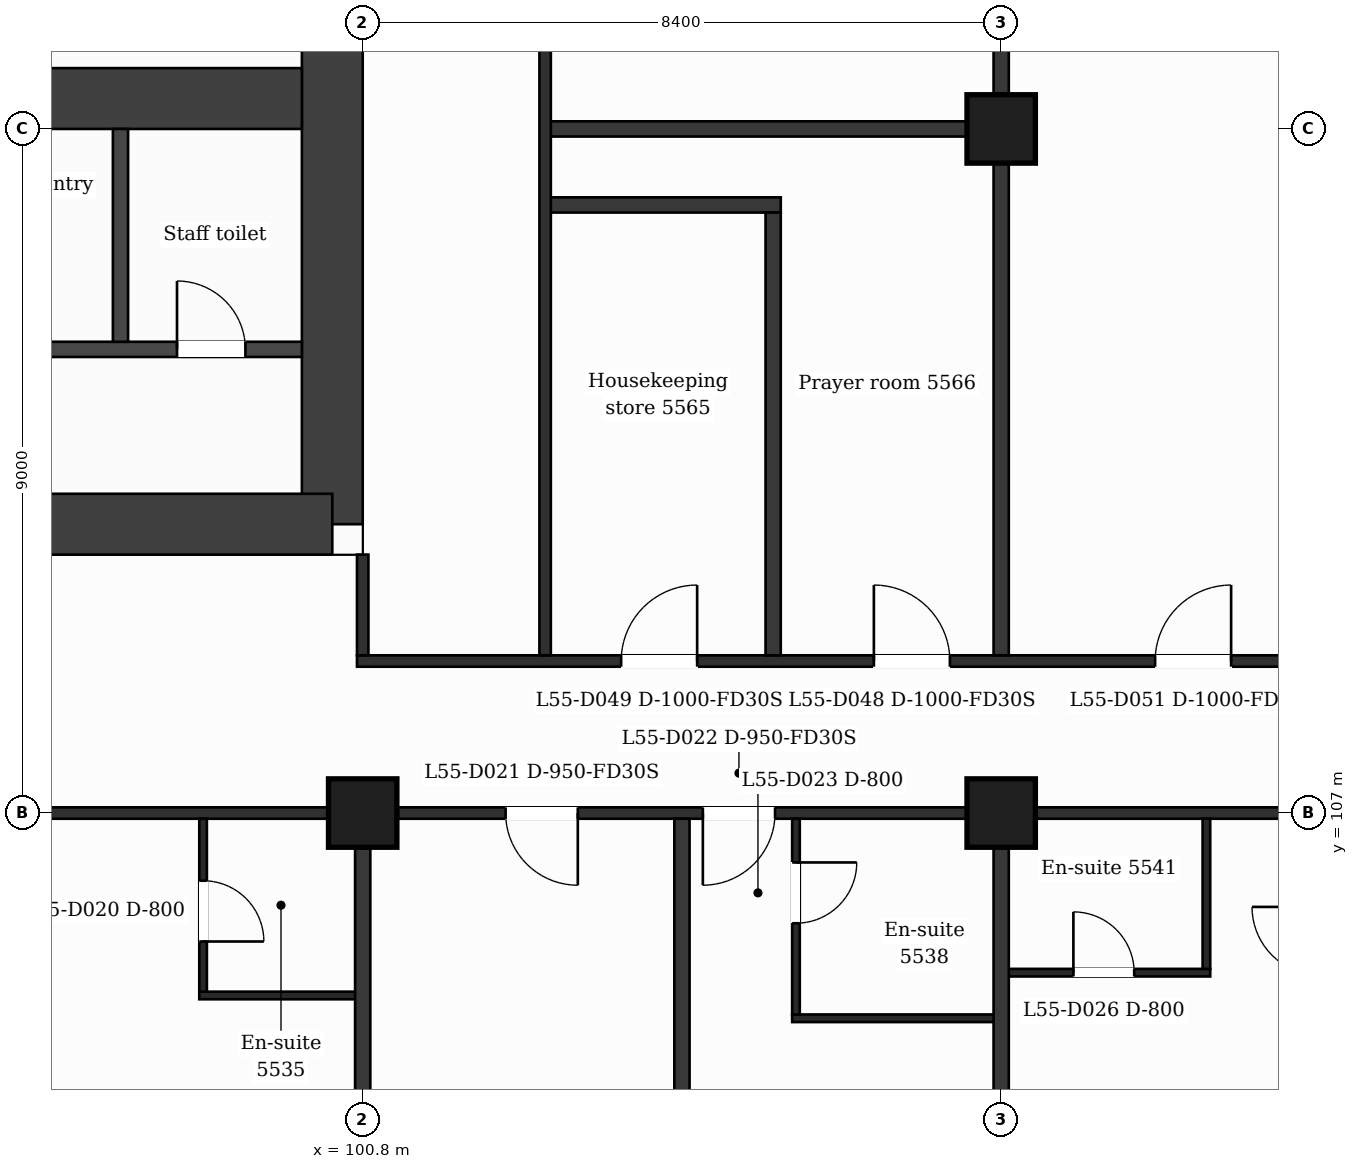
"""IFC4 building model, lengths in metres.
Left out: names, types, materials, properties, quantities, classifications, styles, units other than length and angle.
Written with IfcOpenShell. Run it as: python <this file> out.ifc"""

import sys

from ifc_helpers import new_model, si_unit, direction, frame, frame_2d, origin, origin_2d, place, context, subcontext, project, spatial, rectangle, extrude, element, fill, save


model = new_model("IFC4")
c1 = context("Model", 3, precision=1e-05, world=origin(), true_north=direction((0.0, 1.0)))
c2 = subcontext(c1, "Body", "Model", "MODEL_VIEW")
j1 = project(units=[si_unit("LENGTHUNIT", "METRE"), si_unit("PLANEANGLEUNIT", "RADIAN")], contexts=[c1])
p1 = place(None, origin())
s1 = spatial("IfcSite", under=j1, at=p1, CompositionType="ELEMENT")
p2 = place(p1, origin())
s2 = spatial("IfcBuilding", under=s1, at=p2, CompositionType="ELEMENT")
p3 = place(p2, frame((0.0, 0.0, 228.1)))
s3 = spatial("IfcBuildingStorey", under=s2, at=p3, CompositionType="ELEMENT", Elevation=228.1)
p4 = place(p3, frame((100.4, 132.0, 0.0), z_axis=(0.0, 0.0, 1.0), x_axis=(0.0, -1.0, 0.0)))
e1 = element("IfcWall", 1, at=p4, inside=s3, PredefinedType="SHEAR", context=c2, shape_type="SweptSolid", body=[
    extrude(rectangle(XDim=21.2, YDim=0.8, at=frame_2d((10.6, 0.0))), origin(), (0.0, 0.0, 1.0), 3.7),
])
p5 = place(p4, frame((7.85, 0.0, 0.0)))
e2 = element("IfcOpeningElement", 2, at=p5, cuts=e1, PredefinedType="OPENING", context=c2, shape_type="SweptSolid", body=[
    extrude(rectangle(XDim=1.4, YDim=2.1, at=frame_2d((0.7, 1.05))), frame((0.0, 0.41, 0.0), z_axis=(0.0, -1.0, 0.0), x_axis=(1.0, 0.0, 0.0)), (0.0, 0.0, 1.0), 0.82),
])
p6 = place(p3, frame((100.4, 110.8, 0.0), z_axis=(0.0, 0.0, 1.0), x_axis=(-1.0, 0.0, 0.0)))
e3 = element("IfcWall", 3, at=p6, inside=s3, PredefinedType="SHEAR", context=c2, shape_type="SweptSolid", body=[
    extrude(rectangle(XDim=14.273, YDim=0.8, at=frame_2d((7.137, 0.0))), origin(), (0.0, 0.0, 1.0), 3.7),
])
p7 = place(p6, frame((5.908, 0.0, 0.0)))
e4 = element("IfcOpeningElement", 4, at=p7, cuts=e3, PredefinedType="OPENING", context=c2, shape_type="SweptSolid", body=[
    extrude(rectangle(XDim=1.4, YDim=2.1, at=frame_2d((0.7, 1.05))), frame((0.0, 0.41, 0.0), z_axis=(0.0, -1.0, 0.0), x_axis=(1.0, 0.0, 0.0)), (0.0, 0.0, 1.0), 0.82),
])
p8 = place(p3, frame((94.7, 116.4, 0.0), z_axis=(0.0, 0.0, 1.0), x_axis=(1.0, 0.0, 0.0)))
e5 = element("IfcWall", 5, at=p8, inside=s3, PredefinedType="SHEAR", context=c2, shape_type="SweptSolid", body=[
    extrude(rectangle(XDim=5.3, YDim=0.8, at=frame_2d((2.65, 0.0))), origin(), (0.0, 0.0, 1.0), 3.7),
])
for number, where, z_axis, x_axis in (
    (6, (100.8, 107.0, 0.0), (0.0, 0.0, 1.0), (1.0, 0.0, 0.0)),
    (7, (109.2, 107.0, 0.0), (0.0, 0.0, 1.0), (1.0, 0.0, 0.0)),
    (8, (109.2, 116.0, 0.0), (0.0, 0.0, 1.0), (1.0, 0.0, 0.0)),
):
    element("IfcColumn", number, at=place(p3, frame(where, z_axis=z_axis, x_axis=x_axis)), inside=s3, PredefinedType="COLUMN", context=c2, shape_type="SweptSolid", body=[
        extrude(rectangle(XDim=0.9, YDim=0.9, at=origin_2d()), origin(), (0.0, 0.0, 1.0), 3.7),
    ])
p9 = place(p3, frame((106.45, 104.3, 0.0), z_axis=(0.0, 0.0, 1.0), x_axis=(1.0, 0.0, 0.0)))
e9 = element("IfcWall", 9, at=p9, inside=s3, PredefinedType="PARTITIONING", context=c2, shape_type="SweptSolid", body=[
    extrude(rectangle(XDim=2.75, YDim=0.1, at=frame_2d((1.375, 0.0))), origin(), (0.0, 0.0, 1.0), 3.38),
])
p10 = place(p3, frame((98.65, 104.6, 0.0), z_axis=(0.0, 0.0, 1.0), x_axis=(1.0, 0.0, 0.0)))
e10 = element("IfcWall", 10, at=p10, inside=s3, PredefinedType="PARTITIONING", context=c2, shape_type="SweptSolid", body=[
    extrude(rectangle(XDim=2.15, YDim=0.1, at=frame_2d((1.075, 0.0))), origin(), (0.0, 0.0, 1.0), 3.38),
])
p11 = place(p3, frame((109.2, 104.9, 0.0), z_axis=(0.0, 0.0, 1.0), x_axis=(1.0, 0.0, 0.0)))
e11 = element("IfcWall", 11, at=p11, inside=s3, PredefinedType="PARTITIONING", context=c2, shape_type="SweptSolid", body=[
    extrude(rectangle(XDim=2.75, YDim=0.1, at=frame_2d((1.375, 0.0))), origin(), (0.0, 0.0, 1.0), 3.38),
])
p12 = place(p11, frame((0.95, 0.0, 0.0)))
e12 = element("IfcOpeningElement", 12, at=p12, cuts=e11, PredefinedType="OPENING", context=c2, shape_type="SweptSolid", body=[
    extrude(rectangle(XDim=0.8, YDim=2.1, at=frame_2d((0.4, 1.05))), frame((0.0, 0.06, 0.0), z_axis=(0.0, -1.0, 0.0), x_axis=(1.0, 0.0, 0.0)), (0.0, 0.0, 1.0), 0.12),
])
p13 = place(p3, frame((87.018, 107.0, 0.0), z_axis=(0.0, 0.0, 1.0), x_axis=(1.0, 0.0, 0.0)))
e13 = element("IfcWall", 13, at=p13, inside=s3, PredefinedType="PARTITIONING", context=c2, shape_type="SweptSolid", body=[
    extrude(rectangle(XDim=52.765, YDim=0.15, at=frame_2d((26.382, 0.0))), origin(), (0.0, 0.0, 1.0), 3.38),
])
p14 = place(p13, frame((0.707, 0.0, 0.0)))
e14 = element("IfcOpeningElement", 14, at=p14, cuts=e13, PredefinedType="OPENING", context=c2, shape_type="SweptSolid", body=[
    extrude(rectangle(XDim=0.95, YDim=2.1, at=frame_2d((0.475, 1.05))), frame((0.0, 0.085, 0.0), z_axis=(0.0, -1.0, 0.0), x_axis=(1.0, 0.0, 0.0)), (0.0, 0.0, 1.0), 0.17),
])
p15 = place(p13, frame((6.894, 0.0, 0.0)))
e15 = element("IfcOpeningElement", 15, at=p15, cuts=e13, PredefinedType="OPENING", context=c2, shape_type="SweptSolid", body=[
    extrude(rectangle(XDim=0.95, YDim=2.1, at=frame_2d((0.475, 1.05))), frame((0.0, 0.085, 0.0), z_axis=(0.0, -1.0, 0.0), x_axis=(1.0, 0.0, 0.0)), (0.0, 0.0, 1.0), 0.17),
])
p16 = place(p13, frame((15.662, 0.0, 0.0)))
e16 = element("IfcOpeningElement", 16, at=p16, cuts=e13, PredefinedType="OPENING", context=c2, shape_type="SweptSolid", body=[
    extrude(rectangle(XDim=0.95, YDim=2.1, at=frame_2d((0.475, 1.05))), frame((0.0, 0.085, 0.0), z_axis=(0.0, -1.0, 0.0), x_axis=(1.0, 0.0, 0.0)), (0.0, 0.0, 1.0), 0.17),
])
p17 = place(p13, frame((18.257, 0.0, 0.0)))
e17 = element("IfcOpeningElement", 17, at=p17, cuts=e13, PredefinedType="OPENING", context=c2, shape_type="SweptSolid", body=[
    extrude(rectangle(XDim=0.95, YDim=2.1, at=frame_2d((0.475, 1.05))), frame((0.0, 0.085, 0.0), z_axis=(0.0, -1.0, 0.0), x_axis=(1.0, 0.0, 0.0)), (0.0, 0.0, 1.0), 0.17),
])
p18 = place(p13, frame((28.607, 0.0, 0.0)))
e18 = element("IfcOpeningElement", 18, at=p18, cuts=e13, PredefinedType="OPENING", context=c2, shape_type="SweptSolid", body=[
    extrude(rectangle(XDim=1.0, YDim=2.1, at=frame_2d((0.5, 1.05))), frame((0.0, 0.085, 0.0), z_axis=(0.0, -1.0, 0.0), x_axis=(1.0, 0.0, 0.0)), (0.0, 0.0, 1.0), 0.17),
])
p19 = place(p13, frame((31.302, 0.0, 0.0)))
e19 = element("IfcOpeningElement", 19, at=p19, cuts=e13, PredefinedType="OPENING", context=c2, shape_type="SweptSolid", body=[
    extrude(rectangle(XDim=0.95, YDim=2.1, at=frame_2d((0.475, 1.05))), frame((0.0, 0.085, 0.0), z_axis=(0.0, -1.0, 0.0), x_axis=(1.0, 0.0, 0.0)), (0.0, 0.0, 1.0), 0.17),
])
p20 = place(p13, frame((35.057, 0.0, 0.0)))
e20 = element("IfcOpeningElement", 20, at=p20, cuts=e13, PredefinedType="OPENING", context=c2, shape_type="SweptSolid", body=[
    extrude(rectangle(XDim=0.95, YDim=2.1, at=frame_2d((0.475, 1.05))), frame((0.0, 0.085, 0.0), z_axis=(0.0, -1.0, 0.0), x_axis=(1.0, 0.0, 0.0)), (0.0, 0.0, 1.0), 0.17),
])
p21 = place(p13, frame((41.957, 0.0, 0.0)))
e21 = element("IfcOpeningElement", 21, at=p21, cuts=e13, PredefinedType="OPENING", context=c2, shape_type="SweptSolid", body=[
    extrude(rectangle(XDim=0.95, YDim=2.1, at=frame_2d((0.475, 1.05))), frame((0.0, 0.085, 0.0), z_axis=(0.0, -1.0, 0.0), x_axis=(1.0, 0.0, 0.0)), (0.0, 0.0, 1.0), 0.17),
])
p22 = place(p13, frame((45.712, 0.0, 0.0)))
e22 = element("IfcOpeningElement", 22, at=p22, cuts=e13, PredefinedType="OPENING", context=c2, shape_type="SweptSolid", body=[
    extrude(rectangle(XDim=1.0, YDim=2.1, at=frame_2d((0.5, 1.05))), frame((0.0, 0.085, 0.0), z_axis=(0.0, -1.0, 0.0), x_axis=(1.0, 0.0, 0.0)), (0.0, 0.0, 1.0), 0.17),
])
p23 = place(p13, frame((48.974, 0.0, 0.0)))
e23 = element("IfcOpeningElement", 23, at=p23, cuts=e13, PredefinedType="OPENING", context=c2, shape_type="SweptSolid", body=[
    extrude(rectangle(XDim=0.95, YDim=2.1, at=frame_2d((0.475, 1.05))), frame((0.0, 0.085, 0.0), z_axis=(0.0, -1.0, 0.0), x_axis=(1.0, 0.0, 0.0)), (0.0, 0.0, 1.0), 0.17),
])
p24 = place(p3, frame((100.725, 109.0, 0.0), z_axis=(0.0, 0.0, 1.0), x_axis=(1.0, 0.0, 0.0)))
e24 = element("IfcWall", 24, at=p24, inside=s3, PredefinedType="PARTITIONING", context=c2, shape_type="SweptSolid", body=[
    extrude(rectangle(XDim=25.35, YDim=0.15, at=frame_2d((12.675, 0.0))), origin(), (0.0, 0.0, 1.0), 3.38),
])
p25 = place(p24, frame((6.8, 0.0, 0.0)))
e25 = element("IfcOpeningElement", 25, at=p25, cuts=e24, PredefinedType="OPENING", context=c2, shape_type="SweptSolid", body=[
    extrude(rectangle(XDim=1.0, YDim=2.1, at=frame_2d((0.5, 1.05))), frame((0.0, 0.085, 0.0), z_axis=(0.0, -1.0, 0.0), x_axis=(1.0, 0.0, 0.0)), (0.0, 0.0, 1.0), 0.17),
])
p26 = place(p24, frame((3.475, 0.0, 0.0)))
e26 = element("IfcOpeningElement", 26, at=p26, cuts=e24, PredefinedType="OPENING", context=c2, shape_type="SweptSolid", body=[
    extrude(rectangle(XDim=1.0, YDim=2.1, at=frame_2d((0.5, 1.05))), frame((0.0, 0.085, 0.0), z_axis=(0.0, -1.0, 0.0), x_axis=(1.0, 0.0, 0.0)), (0.0, 0.0, 1.0), 0.17),
])
p27 = place(p24, frame((10.5, 0.0, 0.0)))
e27 = element("IfcOpeningElement", 27, at=p27, cuts=e24, PredefinedType="OPENING", context=c2, shape_type="SweptSolid", body=[
    extrude(rectangle(XDim=1.0, YDim=2.1, at=frame_2d((0.5, 1.05))), frame((0.0, 0.085, 0.0), z_axis=(0.0, -1.0, 0.0), x_axis=(1.0, 0.0, 0.0)), (0.0, 0.0, 1.0), 0.17),
])
p28 = place(p24, frame((19.375, 0.0, 0.0)))
e28 = element("IfcOpeningElement", 28, at=p28, cuts=e24, PredefinedType="OPENING", context=c2, shape_type="SweptSolid", body=[
    extrude(rectangle(XDim=1.0, YDim=2.1, at=frame_2d((0.5, 1.05))), frame((0.0, 0.085, 0.0), z_axis=(0.0, -1.0, 0.0), x_axis=(1.0, 0.0, 0.0)), (0.0, 0.0, 1.0), 0.17),
])
p29 = place(p3, frame((95.127, 113.1, 0.0), z_axis=(0.0, 0.0, 1.0), x_axis=(1.0, 0.0, 0.0)))
e29 = element("IfcWall", 29, at=p29, inside=s3, PredefinedType="PARTITIONING", context=c2, shape_type="SweptSolid", body=[
    extrude(rectangle(XDim=4.873, YDim=0.2, at=frame_2d((2.437, 0.0))), origin(), (0.0, 0.0, 1.0), 3.38),
])
p30 = place(p29, frame((3.23, 0.0, 0.0)))
e30 = element("IfcOpeningElement", 30, at=p30, cuts=e29, PredefinedType="OPENING", context=c2, shape_type="SweptSolid", body=[
    extrude(rectangle(XDim=0.9, YDim=2.1, at=frame_2d((0.45, 1.05))), frame((0.0, 0.11, 0.0), z_axis=(0.0, -1.0, 0.0), x_axis=(1.0, 0.0, 0.0)), (0.0, 0.0, 1.0), 0.22),
])
p31 = place(p3, frame((103.2, 115.0, 0.0), z_axis=(0.0, 0.0, 1.0), x_axis=(1.0, 0.0, 0.0)))
e31 = element("IfcWall", 31, at=p31, inside=s3, PredefinedType="PARTITIONING", context=c2, shape_type="SweptSolid", body=[
    extrude(rectangle(XDim=3.1, YDim=0.2, at=frame_2d((1.55, 0.0))), origin(), (0.0, 0.0, 1.0), 3.38),
])
p32 = place(p3, frame((103.2, 116.0, 0.0), z_axis=(0.0, 0.0, 1.0), x_axis=(1.0, 0.0, 0.0)))
e32 = element("IfcWall", 32, at=p32, inside=s3, PredefinedType="PARTITIONING", context=c2, shape_type="SweptSolid", body=[
    extrude(rectangle(XDim=6.0, YDim=0.2, at=frame_2d((3.0, 0.0))), origin(), (0.0, 0.0, 1.0), 3.38),
])
p33 = place(p3, frame((97.614, 113.2, 0.0), z_axis=(0.0, 0.0, 1.0), x_axis=(0.0, 1.0, 0.0)))
e33 = element("IfcWall", 33, at=p33, inside=s3, PredefinedType="PARTITIONING", context=c2, shape_type="SweptSolid", body=[
    extrude(rectangle(XDim=2.8, YDim=0.2, at=frame_2d((1.4, 0.0))), origin(), (0.0, 0.0, 1.0), 3.38),
])
p34 = place(p3, frame((98.7, 104.65, 0.0), z_axis=(0.0, 0.0, 1.0), x_axis=(0.0, 1.0, 0.0)))
e34 = element("IfcWall", 34, at=p34, inside=s3, PredefinedType="PARTITIONING", context=c2, shape_type="SweptSolid", body=[
    extrude(rectangle(XDim=2.275, YDim=0.1, at=frame_2d((1.138, 0.0))), origin(), (0.0, 0.0, 1.0), 3.38),
])
p35 = place(p34, frame((0.66, 0.0, 0.0)))
e35 = element("IfcOpeningElement", 35, at=p35, cuts=e34, PredefinedType="OPENING", context=c2, shape_type="SweptSolid", body=[
    extrude(rectangle(XDim=0.8, YDim=2.1, at=frame_2d((0.4, 1.05))), frame((0.0, 0.06, 0.0), z_axis=(0.0, -1.0, 0.0), x_axis=(1.0, 0.0, 0.0)), (0.0, 0.0, 1.0), 0.12),
])
p36 = place(p3, frame((100.8, 99.79, 0.0), z_axis=(0.0, 0.0, 1.0), x_axis=(0.0, 1.0, 0.0)))
e36 = element("IfcWall", 36, at=p36, inside=s3, PredefinedType="PARTITIONING", context=c2, shape_type="SweptSolid", body=[
    extrude(rectangle(XDim=7.135, YDim=0.2, at=frame_2d((3.567, 0.0))), origin(), (0.0, 0.0, 1.0), 3.38),
])
p37 = place(p3, frame((100.8, 109.075, 0.0), z_axis=(0.0, 0.0, 1.0), x_axis=(0.0, 1.0, 0.0)))
e37 = element("IfcWall", 37, at=p37, inside=s3, PredefinedType="PARTITIONING", context=c2, shape_type="SweptSolid", body=[
    extrude(rectangle(XDim=1.325, YDim=0.15, at=frame_2d((0.663, 0.0))), origin(), (0.0, 0.0, 1.0), 3.38),
])
p38 = place(p3, frame((103.2, 109.075, 0.0), z_axis=(0.0, 0.0, 1.0), x_axis=(0.0, 1.0, 0.0)))
e38 = element("IfcWall", 38, at=p38, inside=s3, PredefinedType="PARTITIONING", context=c2, shape_type="SweptSolid", body=[
    extrude(rectangle(XDim=24.65, YDim=0.15, at=frame_2d((12.325, 0.0))), origin(), (0.0, 0.0, 1.0), 3.38),
])
p39 = place(p3, frame((105.0, 99.79, 0.0), z_axis=(0.0, 0.0, 1.0), x_axis=(0.0, 1.0, 0.0)))
e39 = element("IfcWall", 39, at=p39, inside=s3, PredefinedType="PARTITIONING", context=c2, shape_type="SweptSolid", body=[
    extrude(rectangle(XDim=7.135, YDim=0.2, at=frame_2d((3.567, 0.0))), origin(), (0.0, 0.0, 1.0), 3.38),
])
p40 = place(p3, frame((106.2, 109.075, 0.0), z_axis=(0.0, 0.0, 1.0), x_axis=(0.0, 1.0, 0.0)))
e40 = element("IfcWall", 40, at=p40, inside=s3, PredefinedType="PARTITIONING", context=c2, shape_type="SweptSolid", body=[
    extrude(rectangle(XDim=5.825, YDim=0.2, at=frame_2d((2.913, 0.0))), origin(), (0.0, 0.0, 1.0), 3.38),
])
p41 = place(p3, frame((106.5, 104.35, 0.0), z_axis=(0.0, 0.0, 1.0), x_axis=(0.0, 1.0, 0.0)))
e41 = element("IfcWall", 41, at=p41, inside=s3, PredefinedType="PARTITIONING", context=c2, shape_type="SweptSolid", body=[
    extrude(rectangle(XDim=2.575, YDim=0.1, at=frame_2d((1.288, 0.0))), origin(), (0.0, 0.0, 1.0), 3.38),
])
p42 = place(p41, frame((1.2, 0.0, 0.0)))
e42 = element("IfcOpeningElement", 42, at=p42, cuts=e41, PredefinedType="OPENING", context=c2, shape_type="SweptSolid", body=[
    extrude(rectangle(XDim=0.8, YDim=2.1, at=frame_2d((0.4, 1.05))), frame((0.0, 0.06, 0.0), z_axis=(0.0, -1.0, 0.0), x_axis=(1.0, 0.0, 0.0)), (0.0, 0.0, 1.0), 0.12),
])
p43 = place(p3, frame((109.2, 99.79, 0.0), z_axis=(0.0, 0.0, 1.0), x_axis=(0.0, 1.0, 0.0)))
e43 = element("IfcWall", 43, at=p43, inside=s3, PredefinedType="PARTITIONING", context=c2, shape_type="SweptSolid", body=[
    extrude(rectangle(XDim=7.135, YDim=0.2, at=frame_2d((3.567, 0.0))), origin(), (0.0, 0.0, 1.0), 3.38),
])
p44 = place(p3, frame((109.2, 109.075, 0.0), z_axis=(0.0, 0.0, 1.0), x_axis=(0.0, 1.0, 0.0)))
e44 = element("IfcWall", 44, at=p44, inside=s3, PredefinedType="PARTITIONING", context=c2, shape_type="SweptSolid", body=[
    extrude(rectangle(XDim=24.65, YDim=0.2, at=frame_2d((12.325, 0.0))), origin(), (0.0, 0.0, 1.0), 3.38),
])
p45 = place(p3, frame((111.9, 104.95, 0.0), z_axis=(0.0, 0.0, 1.0), x_axis=(0.0, 1.0, 0.0)))
e45 = element("IfcWall", 45, at=p45, inside=s3, PredefinedType="PARTITIONING", context=c2, shape_type="SweptSolid", body=[
    extrude(rectangle(XDim=1.975, YDim=0.1, at=frame_2d((0.988, 0.0))), origin(), (0.0, 0.0, 1.0), 3.38),
])
p46 = place(p30, origin())
e46 = element("IfcDoor", 46, at=p46, inside=s3, OperationType="SINGLE_SWING_LEFT", PredefinedType="DOOR", context=c2, shape_type="SweptSolid", body=[
    extrude(rectangle(XDim=0.9, YDim=2.1, at=frame_2d((0.45, 1.05))), frame((0.0, 0.025, 0.0), z_axis=(0.0, -1.0, 0.0), x_axis=(1.0, 0.0, 0.0)), (0.0, 0.0, 1.0), 0.05),
])
fill(e30, e46)
p47 = place(p35, origin())
e47 = element("IfcDoor", 47, at=p47, inside=s3, OperationType="SINGLE_SWING_LEFT", PredefinedType="DOOR", context=c2, shape_type="SweptSolid", body=[
    extrude(rectangle(XDim=0.8, YDim=2.1, at=frame_2d((0.4, 1.05))), frame((0.0, 0.025, 0.0), z_axis=(0.0, -1.0, 0.0), x_axis=(1.0, 0.0, 0.0)), (0.0, 0.0, 1.0), 0.05),
])
fill(e35, e47)
p48 = place(p16, origin())
e48 = element("IfcDoor", 48, at=p48, inside=s3, OperationType="SINGLE_SWING_RIGHT", PredefinedType="DOOR", context=c2, shape_type="SweptSolid", body=[
    extrude(rectangle(XDim=0.95, YDim=2.1, at=frame_2d((0.475, 1.05))), frame((0.0, 0.025, 0.0), z_axis=(0.0, -1.0, 0.0), x_axis=(1.0, 0.0, 0.0)), (0.0, 0.0, 1.0), 0.05),
])
fill(e16, e48)
p49 = place(p17, origin())
e49 = element("IfcDoor", 49, at=p49, inside=s3, OperationType="SINGLE_SWING_LEFT", PredefinedType="DOOR", context=c2, shape_type="SweptSolid", body=[
    extrude(rectangle(XDim=0.95, YDim=2.1, at=frame_2d((0.475, 1.05))), frame((0.0, 0.025, 0.0), z_axis=(0.0, -1.0, 0.0), x_axis=(1.0, 0.0, 0.0)), (0.0, 0.0, 1.0), 0.05),
])
fill(e17, e49)
p50 = place(p42, origin())
e50 = element("IfcDoor", 50, at=p50, inside=s3, OperationType="SINGLE_SWING_RIGHT", PredefinedType="DOOR", context=c2, shape_type="SweptSolid", body=[
    extrude(rectangle(XDim=0.8, YDim=2.1, at=frame_2d((0.4, 1.05))), frame((0.0, 0.025, 0.0), z_axis=(0.0, -1.0, 0.0), x_axis=(1.0, 0.0, 0.0)), (0.0, 0.0, 1.0), 0.05),
])
fill(e42, e50)
p51 = place(p12, origin())
e51 = element("IfcDoor", 51, at=p51, inside=s3, OperationType="SINGLE_SWING_LEFT", PredefinedType="DOOR", context=c2, shape_type="SweptSolid", body=[
    extrude(rectangle(XDim=0.8, YDim=2.1, at=frame_2d((0.4, 1.05))), frame((0.0, 0.025, 0.0), z_axis=(0.0, -1.0, 0.0), x_axis=(1.0, 0.0, 0.0)), (0.0, 0.0, 1.0), 0.05),
])
fill(e12, e51)
p52 = place(p25, origin())
e52 = element("IfcDoor", 52, at=p52, inside=s3, OperationType="SINGLE_SWING_LEFT", PredefinedType="DOOR", context=c2, shape_type="SweptSolid", body=[
    extrude(rectangle(XDim=1.0, YDim=2.1, at=frame_2d((0.5, 1.05))), frame((0.0, 0.025, 0.0), z_axis=(0.0, -1.0, 0.0), x_axis=(1.0, 0.0, 0.0)), (0.0, 0.0, 1.0), 0.05),
])
fill(e25, e52)
p53 = place(p26, origin())
e53 = element("IfcDoor", 53, at=p53, inside=s3, OperationType="SINGLE_SWING_RIGHT", PredefinedType="DOOR", context=c2, shape_type="SweptSolid", body=[
    extrude(rectangle(XDim=1.0, YDim=2.1, at=frame_2d((0.5, 1.05))), frame((0.0, 0.025, 0.0), z_axis=(0.0, -1.0, 0.0), x_axis=(1.0, 0.0, 0.0)), (0.0, 0.0, 1.0), 0.05),
])
fill(e26, e53)
p54 = place(p27, origin())
e54 = element("IfcDoor", 54, at=p54, inside=s3, OperationType="SINGLE_SWING_RIGHT", PredefinedType="DOOR", context=c2, shape_type="SweptSolid", body=[
    extrude(rectangle(XDim=1.0, YDim=2.1, at=frame_2d((0.5, 1.05))), frame((0.0, 0.025, 0.0), z_axis=(0.0, -1.0, 0.0), x_axis=(1.0, 0.0, 0.0)), (0.0, 0.0, 1.0), 0.05),
])
fill(e27, e54)
save(model, sys.argv[1])
